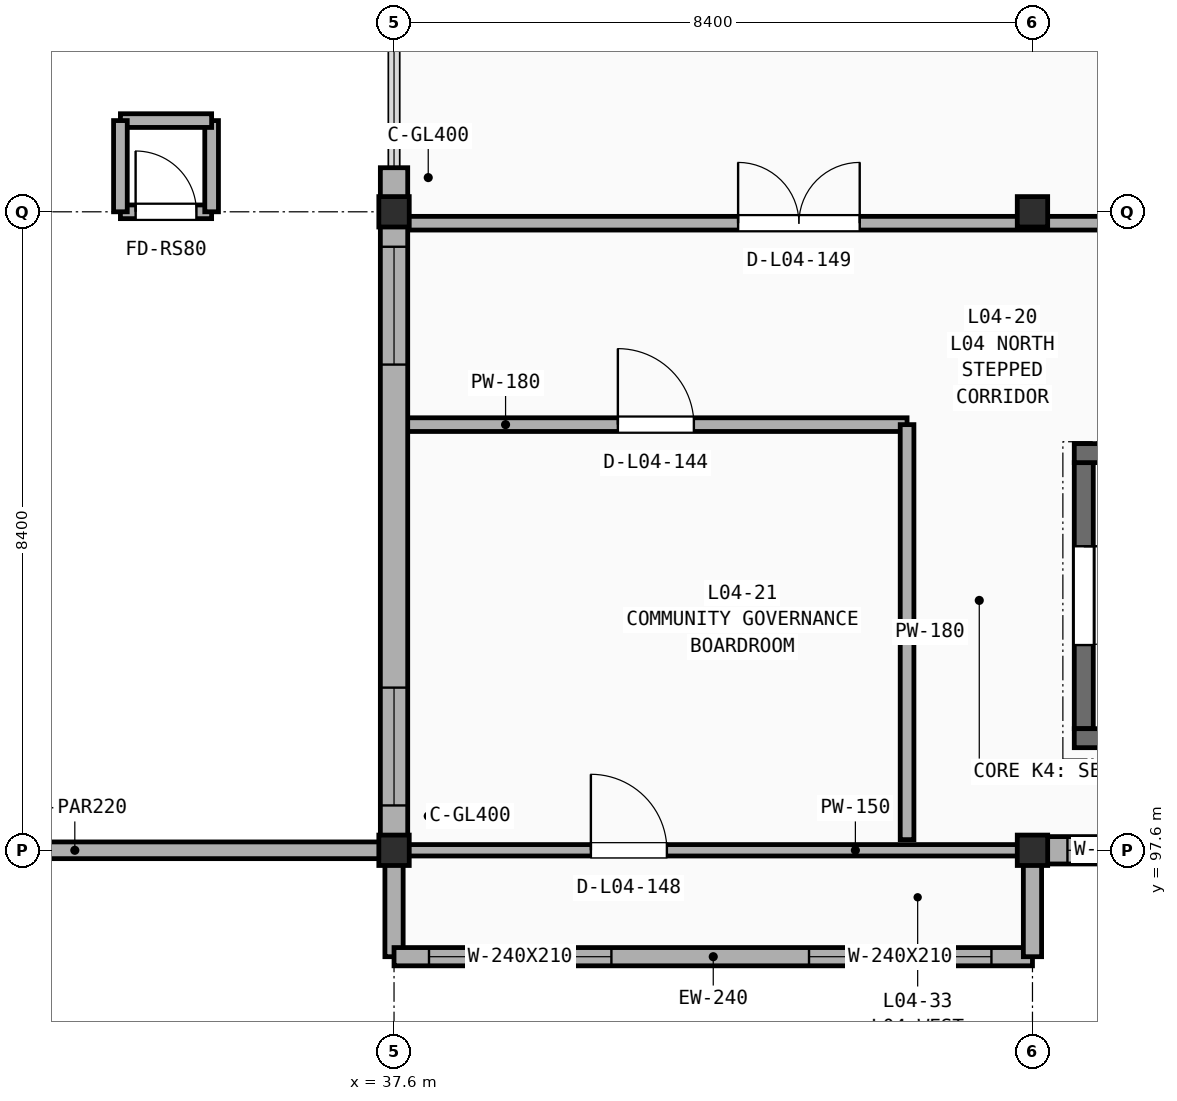
"""IFC4 building model, lengths in metres.
Left out: names, types, materials, properties, quantities, classifications, styles, units other than length and angle.
Written with IfcOpenShell. Run it as: python <this file> out.ifc"""

import sys

from ifc_helpers import new_model, si_unit, direction, frame, frame_2d, origin, origin_2d, place, context, subcontext, project, spatial, rectangle, extrude, element, fill, save


model = new_model("IFC4")
c1 = context("Model", 3, precision=1e-05, world=origin(), true_north=direction((0.0, 1.0)))
c2 = subcontext(c1, "Body", "Model", "MODEL_VIEW")
j1 = project(units=[si_unit("LENGTHUNIT", "METRE"), si_unit("PLANEANGLEUNIT", "RADIAN")], contexts=[c1])
p1 = place(None, origin())
s1 = spatial("IfcSite", under=j1, at=p1, CompositionType="ELEMENT")
p2 = place(p1, origin())
s2 = spatial("IfcBuilding", under=s1, at=p2, CompositionType="ELEMENT")
p3 = place(p2, frame((0.0, 0.0, 17.7)))
s3 = spatial("IfcBuildingStorey", under=s2, at=p3, CompositionType="ELEMENT", Elevation=17.7)
for number, where, z_axis, x_axis in (
    (1, (37.6, 97.6, 0.0), (0.0, 0.0, 1.0), (1.0, 0.0, 0.0)),
    (2, (37.6, 106.0, 0.0), (0.0, 0.0, 1.0), (1.0, 0.0, 0.0)),
    (3, (46.0, 97.6, 0.0), (0.0, 0.0, 1.0), (1.0, 0.0, 0.0)),
    (4, (46.0, 106.0, 0.0), (0.0, 0.0, 1.0), (1.0, 0.0, 0.0)),
):
    element("IfcColumn", number, at=place(p3, frame(where, z_axis=z_axis, x_axis=x_axis)), inside=s3, PredefinedType="COLUMN", context=c2, shape_type="SweptSolid", body=[
        extrude(rectangle(XDim=0.4, YDim=0.4, at=origin_2d()), origin(), (0.0, 0.0, 1.0), 3.9),
    ])
p4 = place(p3, frame((37.74, 103.2, 0.0), z_axis=(0.0, 0.0, 1.0), x_axis=(1.0, 0.0, 0.0)))
e5 = element("IfcWall", 5, at=p4, inside=s3, PredefinedType="PARTITIONING", context=c2, shape_type="SweptSolid", body=[
    extrude(rectangle(XDim=6.61, YDim=0.18, at=frame_2d((3.305, 0.0))), origin(), (0.0, 0.0, 1.0), 3.09),
])
p5 = place(p4, frame((2.805, 0.0, -0.01)))
e6 = element("IfcOpeningElement", 6, at=p5, cuts=e5, PredefinedType="OPENING", context=c2, shape_type="SweptSolid", body=[
    extrude(rectangle(XDim=1.0, YDim=2.16, at=frame_2d((0.5, 1.08))), frame((0.0, 0.1, 0.0), z_axis=(0.0, -1.0, 0.0), x_axis=(1.0, 0.0, 0.0)), (0.0, 0.0, 1.0), 0.2),
])
p6 = place(p3, frame((44.35, 97.74, 0.0), z_axis=(0.0, 0.0, 1.0), x_axis=(0.0, 1.0, 0.0)))
e7 = element("IfcWall", 7, at=p6, inside=s3, PredefinedType="PARTITIONING", context=c2, shape_type="SweptSolid", body=[
    extrude(rectangle(XDim=5.46, YDim=0.18, at=frame_2d((2.73, 0.0))), origin(), (0.0, 0.0, 1.0), 3.01),
])
p7 = place(p3, frame((37.6, 97.6, 0.0), z_axis=(0.0, 0.0, 1.0), x_axis=(1.0, 0.0, 0.0)))
e8 = element("IfcWall", 8, at=p7, inside=s3, PredefinedType="PARTITIONING", context=c2, shape_type="SweptSolid", body=[
    extrude(rectangle(XDim=8.4, YDim=0.15, at=frame_2d((4.2, 0.0))), origin(), (0.0, 0.0, 1.0), 3.01),
])
p8 = place(p7, frame((2.59, 0.0, -0.01)))
e9 = element("IfcOpeningElement", 9, at=p8, cuts=e8, PredefinedType="OPENING", context=c2, shape_type="SweptSolid", body=[
    extrude(rectangle(XDim=1.0, YDim=2.16, at=frame_2d((0.5, 1.08))), frame((0.0, 0.085, 0.0), z_axis=(0.0, -1.0, 0.0), x_axis=(1.0, 0.0, 0.0)), (0.0, 0.0, 1.0), 0.17),
])
p9 = place(p3, frame((37.74, 105.85, 0.0), z_axis=(0.0, 0.0, 1.0), x_axis=(1.0, 0.0, 0.0)))
e10 = element("IfcWall", 10, at=p9, inside=s3, PredefinedType="PARTITIONING", context=c2, shape_type="SweptSolid", body=[
    extrude(rectangle(XDim=15.31, YDim=0.18, at=frame_2d((7.655, 0.0))), origin(), (0.0, 0.0, 1.0), 3.01),
])
p10 = place(p9, frame((4.387, 0.0, -0.01)))
e11 = element("IfcOpeningElement", 11, at=p10, cuts=e10, PredefinedType="OPENING", context=c2, shape_type="SweptSolid", body=[
    extrude(rectangle(XDim=1.6, YDim=2.21, at=frame_2d((0.8, 1.105))), frame((0.0, 0.1, 0.0), z_axis=(0.0, -1.0, 0.0), x_axis=(1.0, 0.0, 0.0)), (0.0, 0.0, 1.0), 0.2),
])
p11 = place(p3, frame((46.0, 97.6, 0.0), z_axis=(0.0, 0.0, 1.0), x_axis=(1.0, 0.0, 0.0)))
e12 = element("IfcWall", 12, at=p11, inside=s3, PredefinedType="SOLIDWALL", context=c2, shape_type="SweptSolid", body=[
    extrude(rectangle(XDim=4.8, YDim=0.36, at=frame_2d((2.4, 0.0))), origin(), (0.0, 0.0, 1.0), 3.01),
])
p12 = place(p11, frame((0.46, 0.0, 0.75)))
e13 = element("IfcOpeningElement", 13, at=p12, cuts=e12, PredefinedType="OPENING", context=c2, shape_type="SweptSolid", body=[
    extrude(rectangle(XDim=1.55, YDim=2.12, at=frame_2d((0.775, 1.06))), frame((0.0, 0.19, 0.0), z_axis=(0.0, -1.0, 0.0), x_axis=(1.0, 0.0, 0.0)), (0.0, 0.0, 1.0), 0.38),
])
p13 = place(p11, frame((2.66, 0.0, 0.75)))
e14 = element("IfcOpeningElement", 14, at=p13, cuts=e12, PredefinedType="OPENING", context=c2, shape_type="SweptSolid", body=[
    extrude(rectangle(XDim=1.55, YDim=2.12, at=frame_2d((0.775, 1.06))), frame((0.0, 0.19, 0.0), z_axis=(0.0, -1.0, 0.0), x_axis=(1.0, 0.0, 0.0)), (0.0, 0.0, 1.0), 0.38),
])
p14 = place(p3, frame((37.6, 106.0, 0.0), z_axis=(0.0, 0.0, 1.0), x_axis=(0.0, -1.0, 0.0)))
e15 = element("IfcWall", 15, at=p14, inside=s3, PredefinedType="SOLIDWALL", context=c2, shape_type="SweptSolid", body=[
    extrude(rectangle(XDim=8.4, YDim=0.36, at=frame_2d((4.2, 0.0))), origin(), (0.0, 0.0, 1.0), 3.01),
])
p15 = place(p14, frame((0.46, 0.0, 0.75)))
e16 = element("IfcOpeningElement", 16, at=p15, cuts=e15, PredefinedType="OPENING", context=c2, shape_type="SweptSolid", body=[
    extrude(rectangle(XDim=1.55, YDim=2.12, at=frame_2d((0.775, 1.06))), frame((0.0, 0.19, 0.0), z_axis=(0.0, -1.0, 0.0), x_axis=(1.0, 0.0, 0.0)), (0.0, 0.0, 1.0), 0.38),
])
p16 = place(p14, frame((6.26, 0.0, 0.75)))
e17 = element("IfcOpeningElement", 17, at=p16, cuts=e15, PredefinedType="OPENING", context=c2, shape_type="SweptSolid", body=[
    extrude(rectangle(XDim=1.55, YDim=2.12, at=frame_2d((0.775, 1.06))), frame((0.0, 0.19, 0.0), z_axis=(0.0, -1.0, 0.0), x_axis=(1.0, 0.0, 0.0)), (0.0, 0.0, 1.0), 0.38),
])
p17 = place(p3, frame((37.6, 106.58, 0.0), z_axis=(0.0, 0.0, 1.0), x_axis=(0.0, -1.0, 0.0)))
e18 = element("IfcWall", 18, at=p17, inside=s3, PredefinedType="SOLIDWALL", context=c2, shape_type="SweptSolid", body=[
    extrude(rectangle(XDim=0.45, YDim=0.36, at=frame_2d((0.225, 0.0))), origin(), (0.0, 0.0, 1.0), 3.01),
])
p18 = place(p3, frame((37.6, 97.45, 0.0), z_axis=(0.0, 0.0, 1.0), x_axis=(0.0, -1.0, 0.0)))
e19 = element("IfcWall", 19, at=p18, inside=s3, PredefinedType="SOLIDWALL", context=c2, shape_type="SweptSolid", body=[
    extrude(rectangle(XDim=1.25, YDim=0.24, at=frame_2d((0.625, 0.0))), origin(), (0.0, 0.0, 1.0), 3.01),
])
p19 = place(p3, frame((37.6, 96.2, 0.0), z_axis=(0.0, 0.0, 1.0), x_axis=(1.0, 0.0, 0.0)))
e20 = element("IfcWall", 20, at=p19, inside=s3, PredefinedType="SOLIDWALL", context=c2, shape_type="SweptSolid", body=[
    extrude(rectangle(XDim=8.4, YDim=0.24, at=frame_2d((4.2, 0.0))), origin(), (0.0, 0.0, 1.0), 3.01),
])
p20 = place(p19, frame((0.46, 0.0, 0.65)))
e21 = element("IfcOpeningElement", 21, at=p20, cuts=e20, PredefinedType="OPENING", context=c2, shape_type="SweptSolid", body=[
    extrude(rectangle(XDim=2.4, YDim=2.1, at=frame_2d((1.2, 1.05))), frame((0.0, 0.13, 0.0), z_axis=(0.0, -1.0, 0.0), x_axis=(1.0, 0.0, 0.0)), (0.0, 0.0, 1.0), 0.26),
])
p21 = place(p19, frame((5.46, 0.0, 0.65)))
e22 = element("IfcOpeningElement", 22, at=p21, cuts=e20, PredefinedType="OPENING", context=c2, shape_type="SweptSolid", body=[
    extrude(rectangle(XDim=2.4, YDim=2.1, at=frame_2d((1.2, 1.05))), frame((0.0, 0.13, 0.0), z_axis=(0.0, -1.0, 0.0), x_axis=(1.0, 0.0, 0.0)), (0.0, 0.0, 1.0), 0.26),
])
p22 = place(p3, frame((46.0, 96.2, 0.0), z_axis=(0.0, 0.0, 1.0), x_axis=(0.0, 1.0, 0.0)))
e23 = element("IfcWall", 23, at=p22, inside=s3, PredefinedType="SOLIDWALL", context=c2, shape_type="SweptSolid", body=[
    extrude(rectangle(XDim=1.25, YDim=0.24, at=frame_2d((0.625, 0.0))), origin(), (0.0, 0.0, 1.0), 3.01),
])
p23 = place(p3, frame((29.2, 97.6, 0.0), z_axis=(0.0, 0.0, 1.0), x_axis=(1.0, 0.0, 0.0)))
e24 = element("IfcWall", 24, at=p23, inside=s3, PredefinedType="PARAPET", context=c2, shape_type="SweptSolid", body=[
    extrude(rectangle(XDim=8.4, YDim=0.22, at=frame_2d((4.2, 0.0))), origin(), (0.0, 0.0, 1.0), 1.15),
])
p24 = place(p3, frame((46.675, 102.7, 0.0), z_axis=(0.0, 0.0, 1.0), x_axis=(0.0, -1.0, 0.0)))
e25 = element("IfcWall", 25, at=p24, inside=s3, PredefinedType="SHEAR", context=c2, shape_type="SweptSolid", body=[
    extrude(rectangle(XDim=3.5, YDim=0.25, at=frame_2d((1.75, 0.0))), origin(), (0.0, 0.0, 1.0), 3.9),
])
p25 = place(p24, frame((1.1, 0.0, -0.01)))
e26 = element("IfcOpeningElement", 26, at=p25, cuts=e25, PredefinedType="OPENING", context=c2, shape_type="SweptSolid", body=[
    extrude(rectangle(XDim=1.3, YDim=2.16, at=frame_2d((0.65, 1.08))), frame((0.0, 0.135, 0.0), z_axis=(0.0, -1.0, 0.0), x_axis=(1.0, 0.0, 0.0)), (0.0, 0.0, 1.0), 0.27),
])
for number, where, z_axis, x_axis in (
    (27, (46.55, 99.075, 0.0), (0.0, 0.0, 1.0), (1.0, 0.0, 0.0)),
    (28, (46.55, 102.825, 0.0), (0.0, 0.0, 1.0), (1.0, 0.0, 0.0)),
):
    element("IfcWall", number, at=place(p3, frame(where, z_axis=z_axis, x_axis=x_axis)), inside=s3, PredefinedType="SHEAR", context=c2, shape_type="SweptSolid", body=[
        extrude(rectangle(XDim=8.9, YDim=0.25, at=frame_2d((4.45, 0.0))), origin(), (0.0, 0.0, 1.0), 3.9),
    ])
p26 = place(p3, frame((34.0, 106.0, 0.0), z_axis=(0.0, 0.0, 1.0), x_axis=(1.0, 0.0, 0.0)))
e29 = element("IfcWall", 29, at=p26, inside=s3, PredefinedType="SOLIDWALL", context=c2, shape_type="SweptSolid", body=[
    extrude(rectangle(XDim=1.2, YDim=0.18, at=frame_2d((0.6, 0.0))), origin(), (0.0, 0.0, 1.0), 3.69),
])
p27 = place(p26, frame((0.2, 0.0, -0.01)))
e30 = element("IfcOpeningElement", 30, at=p27, cuts=e29, PredefinedType="OPENING", context=c2, shape_type="SweptSolid", body=[
    extrude(rectangle(XDim=0.8, YDim=2.06, at=frame_2d((0.4, 1.03))), frame((0.0, 0.1, 0.0), z_axis=(0.0, -1.0, 0.0), x_axis=(1.0, 0.0, 0.0)), (0.0, 0.0, 1.0), 0.2),
])
for number, where, z_axis, x_axis in (
    (31, (35.2, 106.0, 0.0), (0.0, 0.0, 1.0), (0.0, 1.0, 0.0)),
    (32, (35.2, 107.2, 0.0), (0.0, 0.0, 1.0), (-1.0, 0.0, 0.0)),
    (33, (34.0, 107.2, 0.0), (0.0, 0.0, 1.0), (0.0, -1.0, 0.0)),
):
    element("IfcWall", number, at=place(p3, frame(where, z_axis=z_axis, x_axis=x_axis)), inside=s3, PredefinedType="SOLIDWALL", context=c2, shape_type="SweptSolid", body=[
        extrude(rectangle(XDim=1.2, YDim=0.18, at=frame_2d((0.6, 0.0))), origin(), (0.0, 0.0, 1.0), 3.69),
    ])
p28 = place(p5, frame((1.0, 0.0, 0.01), z_axis=(0.0, 0.0, 1.0), x_axis=(-1.0, 0.0, 0.0)))
e34 = element("IfcDoor", 34, at=p28, inside=s3, OperationType="SINGLE_SWING_LEFT", PredefinedType="DOOR", context=c2, shape_type="SweptSolid", body=[
    extrude(rectangle(XDim=1.0, YDim=2.15, at=frame_2d((0.5, 1.075))), frame((0.0, 0.025, 0.0), z_axis=(0.0, -1.0, 0.0), x_axis=(1.0, 0.0, 0.0)), (0.0, 0.0, 1.0), 0.05),
])
fill(e6, e34)
p29 = place(p8, frame((0.0, 0.0, 0.01)))
e35 = element("IfcDoor", 35, at=p29, inside=s3, OperationType="SINGLE_SWING_LEFT", PredefinedType="DOOR", context=c2, shape_type="SweptSolid", body=[
    extrude(rectangle(XDim=1.0, YDim=2.15, at=frame_2d((0.5, 1.075))), frame((0.0, 0.025, 0.0), z_axis=(0.0, -1.0, 0.0), x_axis=(1.0, 0.0, 0.0)), (0.0, 0.0, 1.0), 0.05),
])
fill(e9, e35)
p30 = place(p10, frame((0.0, 0.0, 0.01)))
e36 = element("IfcDoor", 36, at=p30, inside=s3, OperationType="DOUBLE_SWING_LEFT", PredefinedType="DOOR", context=c2, shape_type="SweptSolid", body=[
    extrude(rectangle(XDim=1.6, YDim=2.2, at=frame_2d((0.8, 1.1))), frame((0.0, 0.025, 0.0), z_axis=(0.0, -1.0, 0.0), x_axis=(1.0, 0.0, 0.0)), (0.0, 0.0, 1.0), 0.05),
])
fill(e11, e36)
p31 = place(p12, origin())
e37 = element("IfcWindow", 37, at=p31, inside=s3, PartitioningType="DOUBLE_PANEL_HORIZONTAL", PredefinedType="WINDOW", context=c2, shape_type="SweptSolid", body=[
    extrude(rectangle(XDim=1.55, YDim=2.12, at=frame_2d((0.775, 1.06))), frame((0.0, 0.03, 0.0), z_axis=(0.0, -1.0, 0.0), x_axis=(1.0, 0.0, 0.0)), (0.0, 0.0, 1.0), 0.06),
])
fill(e13, e37)
p32 = place(p15, origin())
e38 = element("IfcWindow", 38, at=p32, inside=s3, PartitioningType="DOUBLE_PANEL_HORIZONTAL", PredefinedType="WINDOW", context=c2, shape_type="SweptSolid", body=[
    extrude(rectangle(XDim=1.55, YDim=2.12, at=frame_2d((0.775, 1.06))), frame((0.0, 0.03, 0.0), z_axis=(0.0, -1.0, 0.0), x_axis=(1.0, 0.0, 0.0)), (0.0, 0.0, 1.0), 0.06),
])
fill(e16, e38)
p33 = place(p16, origin())
e39 = element("IfcWindow", 39, at=p33, inside=s3, PartitioningType="DOUBLE_PANEL_HORIZONTAL", PredefinedType="WINDOW", context=c2, shape_type="SweptSolid", body=[
    extrude(rectangle(XDim=1.55, YDim=2.12, at=frame_2d((0.775, 1.06))), frame((0.0, 0.03, 0.0), z_axis=(0.0, -1.0, 0.0), x_axis=(1.0, 0.0, 0.0)), (0.0, 0.0, 1.0), 0.06),
])
fill(e17, e39)
p34 = place(p20, origin())
e40 = element("IfcWindow", 40, at=p34, inside=s3, PartitioningType="TRIPLE_PANEL_VERTICAL", PredefinedType="WINDOW", context=c2, shape_type="SweptSolid", body=[
    extrude(rectangle(XDim=2.4, YDim=2.1, at=frame_2d((1.2, 1.05))), frame((0.0, 0.03, 0.0), z_axis=(0.0, -1.0, 0.0), x_axis=(1.0, 0.0, 0.0)), (0.0, 0.0, 1.0), 0.06),
])
fill(e21, e40)
p35 = place(p21, origin())
e41 = element("IfcWindow", 41, at=p35, inside=s3, PartitioningType="TRIPLE_PANEL_VERTICAL", PredefinedType="WINDOW", context=c2, shape_type="SweptSolid", body=[
    extrude(rectangle(XDim=2.4, YDim=2.1, at=frame_2d((1.2, 1.05))), frame((0.0, 0.03, 0.0), z_axis=(0.0, -1.0, 0.0), x_axis=(1.0, 0.0, 0.0)), (0.0, 0.0, 1.0), 0.06),
])
fill(e22, e41)
p36 = place(p25, frame((1.3, 0.0, 0.01), z_axis=(0.0, 0.0, 1.0), x_axis=(-1.0, 0.0, 0.0)))
e42 = element("IfcDoor", 42, at=p36, inside=s3, OperationType="SINGLE_SWING_LEFT", PredefinedType="DOOR", context=c2, shape_type="SweptSolid", body=[
    extrude(rectangle(XDim=1.3, YDim=2.15, at=frame_2d((0.65, 1.075))), frame((0.0, 0.025, 0.0), z_axis=(0.0, -1.0, 0.0), x_axis=(1.0, 0.0, 0.0)), (0.0, 0.0, 1.0), 0.05),
])
fill(e26, e42)
p37 = place(p27, frame((0.0, 0.0, 0.01)))
e43 = element("IfcDoor", 43, at=p37, inside=s3, OperationType="SINGLE_SWING_LEFT", PredefinedType="DOOR", context=c2, shape_type="SweptSolid", body=[
    extrude(rectangle(XDim=0.8, YDim=2.05, at=frame_2d((0.4, 1.025))), frame((0.0, 0.025, 0.0), z_axis=(0.0, -1.0, 0.0), x_axis=(1.0, 0.0, 0.0)), (0.0, 0.0, 1.0), 0.05),
])
fill(e30, e43)
save(model, sys.argv[1])
